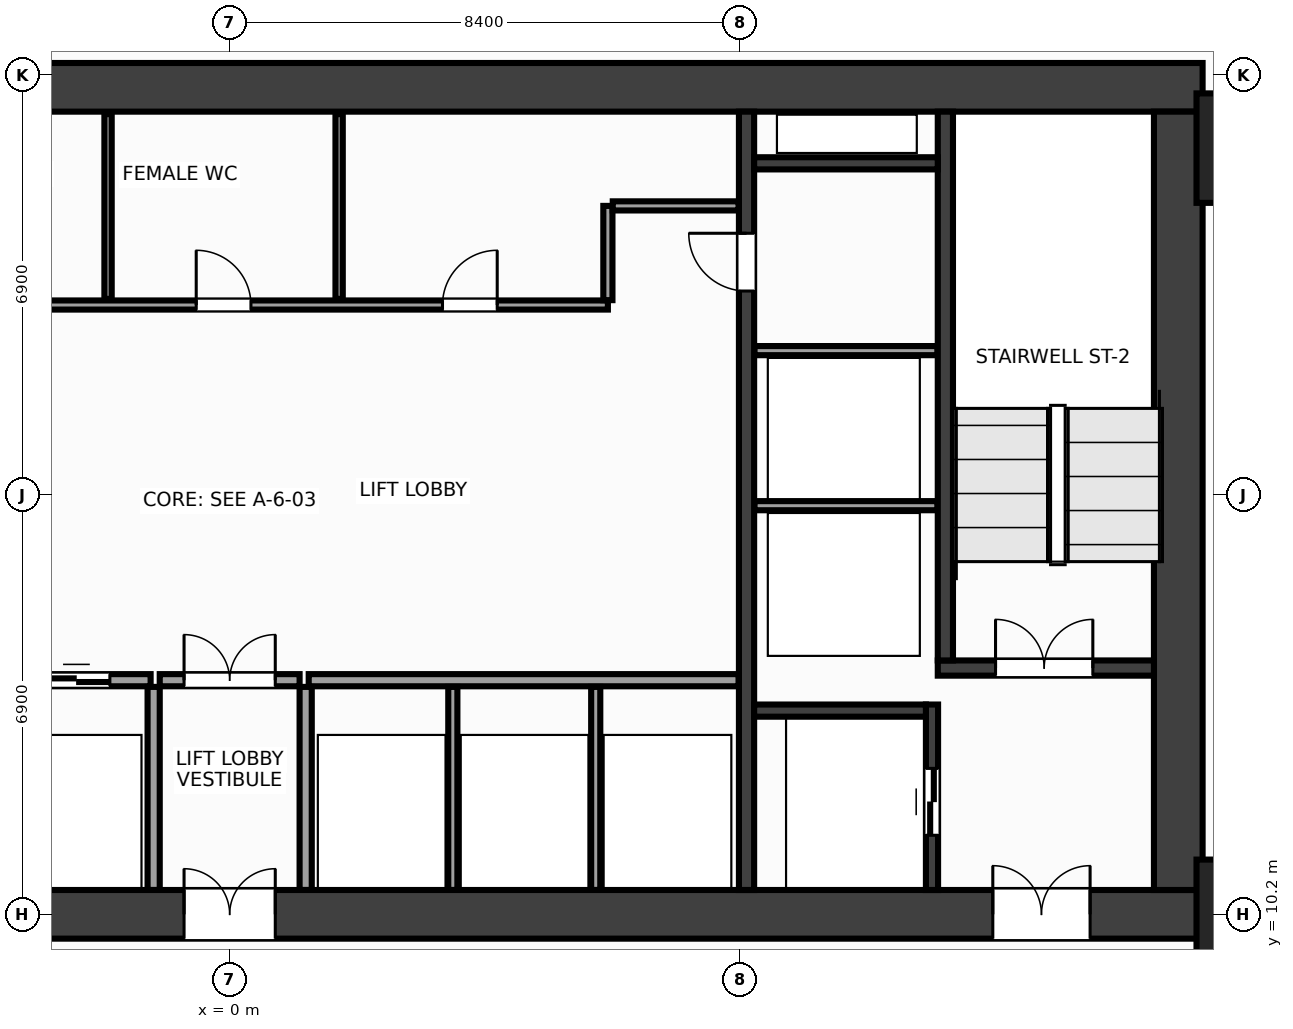
"""IFC4 building model, lengths in metres.
Left out: names, types, materials, properties, quantities, classifications, styles, units other than length and angle.
Written with IfcOpenShell. Run it as: python <this file> out.ifc"""

import sys

from ifc_helpers import new_model, si_unit, direction, frame, frame_2d, origin, origin_2d, place, context, subcontext, project, spatial, rectangle, extrude, source, transform, mapped, element, fill, save


model = new_model("IFC4")
c1 = context("Model", 3, precision=1e-05, world=origin(), true_north=direction((0.0, 1.0)))
c2 = subcontext(c1, "Body", "Model", "MODEL_VIEW")
j1 = project(units=[si_unit("LENGTHUNIT", "METRE"), si_unit("PLANEANGLEUNIT", "RADIAN")], contexts=[c1])
p1 = place(None, origin())
s1 = spatial("IfcSite", under=j1, at=p1, CompositionType="ELEMENT")
p2 = place(p1, origin())
s2 = spatial("IfcBuilding", under=s1, at=p2, CompositionType="ELEMENT")
p3 = place(p2, frame((0.0, 0.0, 34.4)))
s3 = spatial("IfcBuildingStorey", under=s2, at=p3, CompositionType="ELEMENT", Elevation=34.4)
m1 = source(origin(), c2, "Body", "SweptSolid", [
    extrude(rectangle(XDim=32.0, YDim=0.8, at=frame_2d((16.0, 0.0))), origin(), (0.0, 0.0, 1.0), 3.6),
])
p4 = place(p3, frame((-16.0, 23.8, 0.0), z_axis=(0.0, 0.0, 1.0), x_axis=(1.0, 0.0, 0.0)))
e1 = element("IfcWall", 1, at=p4, inside=s3, PredefinedType="SHEAR", context=c2, shape_type="MappedRepresentation", body=[
    mapped(m1, transform((0.0, 0.0, 0.0), x_axis=(1.0, 0.0, 0.0), y_axis=(0.0, 1.0, 0.0), z_axis=(0.0, 0.0, 1.0), scale=1.0)),
])
p5 = place(p3, frame((-16.0, 10.2, 0.0), z_axis=(0.0, 0.0, 1.0), x_axis=(1.0, 0.0, 0.0)))
e2 = element("IfcWall", 2, at=p5, inside=s3, PredefinedType="SHEAR", context=c2, shape_type="MappedRepresentation", body=[
    mapped(m1, transform((0.0, 0.0, 0.0), x_axis=(1.0, 0.0, 0.0), y_axis=(0.0, 1.0, 0.0), z_axis=(0.0, 0.0, 1.0), scale=1.0)),
])
p6 = place(p5, frame((1.85, 0.0, 0.0)))
e3 = element("IfcOpeningElement", 3, at=p6, cuts=e2, PredefinedType="OPENING", context=c2, shape_type="SweptSolid", body=[
    extrude(rectangle(XDim=1.6, YDim=2.15, at=frame_2d((0.8, 1.075))), frame((0.0, 0.412, 0.0), z_axis=(0.0, -1.0, 0.0), x_axis=(1.0, 0.0, 0.0)), (0.0, 0.0, 1.0), 0.824),
])
p7 = place(p5, frame((28.55, 0.0, 0.0)))
e4 = element("IfcOpeningElement", 4, at=p7, cuts=e2, PredefinedType="OPENING", context=c2, shape_type="SweptSolid", body=[
    extrude(rectangle(XDim=1.6, YDim=2.15, at=frame_2d((0.8, 1.075))), frame((0.0, 0.412, 0.0), z_axis=(0.0, -1.0, 0.0), x_axis=(1.0, 0.0, 0.0)), (0.0, 0.0, 1.0), 0.824),
])
p8 = place(p5, frame((15.25, 0.0, 0.0)))
e5 = element("IfcOpeningElement", 5, at=p8, cuts=e2, PredefinedType="OPENING", context=c2, shape_type="SweptSolid", body=[
    extrude(rectangle(XDim=1.5, YDim=2.2, at=frame_2d((0.75, 1.1))), frame((0.0, 0.412, 0.0), z_axis=(0.0, -1.0, 0.0), x_axis=(1.0, 0.0, 0.0)), (0.0, 0.0, 1.0), 0.824),
])
m2 = source(origin(), c2, "Body", "SweptSolid", [
    extrude(rectangle(XDim=12.8, YDim=0.8, at=frame_2d((6.4, 0.0))), origin(), (0.0, 0.0, 1.0), 3.6),
])
p9 = place(p3, frame((15.6, 10.6, 0.0), z_axis=(0.0, 0.0, 1.0), x_axis=(0.0, 1.0, 0.0)))
e6 = element("IfcWall", 6, at=p9, inside=s3, PredefinedType="SHEAR", context=c2, shape_type="MappedRepresentation", body=[
    mapped(m2, transform((0.0, 0.0, 0.0), x_axis=(1.0, 0.0, 0.0), y_axis=(0.0, 1.0, 0.0), z_axis=(0.0, 0.0, 1.0), scale=1.0)),
])
m3 = source(origin(), c2, "Body", "SweptSolid", [
    extrude(rectangle(XDim=12.8, YDim=0.25, at=frame_2d((6.4, 0.0))), origin(), (0.0, 0.0, 1.0), 3.6),
])
p10 = place(p3, frame((8.5, 10.6, 0.0), z_axis=(0.0, 0.0, 1.0), x_axis=(0.0, 1.0, 0.0)))
e7 = element("IfcWall", 7, at=p10, inside=s3, PredefinedType="SHEAR", context=c2, shape_type="MappedRepresentation", body=[
    mapped(m3, transform((0.0, 0.0, 0.0), x_axis=(1.0, 0.0, 0.0), y_axis=(0.0, 1.0, 0.0), z_axis=(0.0, 0.0, 1.0), scale=1.0)),
])
p11 = place(p10, frame((9.85, 0.0, 0.0)))
e8 = element("IfcOpeningElement", 8, at=p11, cuts=e7, PredefinedType="OPENING", context=c2, shape_type="SweptSolid", body=[
    extrude(rectangle(XDim=0.95, YDim=2.15, at=frame_2d((0.475, 1.075))), frame((0.0, 0.137, 0.0), z_axis=(0.0, -1.0, 0.0), x_axis=(1.0, 0.0, 0.0)), (0.0, 0.0, 1.0), 0.274),
])
m4 = source(origin(), c2, "Body", "SweptSolid", [
    extrude(rectangle(XDim=3.555, YDim=0.25, at=frame_2d((1.777, 0.0))), origin(), (0.0, 0.0, 1.0), 3.6),
])
p12 = place(p3, frame((11.645, 14.25, 0.0), z_axis=(0.0, 0.0, 1.0), x_axis=(1.0, 0.0, 0.0)))
e9 = element("IfcWall", 9, at=p12, inside=s3, PredefinedType="SHEAR", context=c2, shape_type="MappedRepresentation", body=[
    mapped(m4, transform((0.0, 0.0, 0.0), x_axis=(1.0, 0.0, 0.0), y_axis=(0.0, 1.0, 0.0), z_axis=(0.0, 0.0, 1.0), scale=1.0)),
])
p13 = place(p12, frame((0.95, 0.0, 0.0)))
e10 = element("IfcOpeningElement", 10, at=p13, cuts=e9, PredefinedType="OPENING", context=c2, shape_type="SweptSolid", body=[
    extrude(rectangle(XDim=1.6, YDim=2.15, at=frame_2d((0.8, 1.075))), frame((0.0, 0.137, 0.0), z_axis=(0.0, -1.0, 0.0), x_axis=(1.0, 0.0, 0.0)), (0.0, 0.0, 1.0), 0.274),
])
m5 = source(origin(), c2, "Body", "SweptSolid", [
    extrude(rectangle(XDim=9.025, YDim=0.25, at=frame_2d((4.512, 0.0))), origin(), (0.0, 0.0, 1.0), 3.6),
])
p14 = place(p3, frame((11.77, 14.375, 0.0), z_axis=(0.0, 0.0, 1.0), x_axis=(0.0, 1.0, 0.0)))
e11 = element("IfcWall", 11, at=p14, inside=s3, PredefinedType="SHEAR", context=c2, shape_type="MappedRepresentation", body=[
    mapped(m5, transform((0.0, 0.0, 0.0), x_axis=(1.0, 0.0, 0.0), y_axis=(0.0, 1.0, 0.0), z_axis=(0.0, 0.0, 1.0), scale=1.0)),
])
m6 = source(origin(), c2, "Body", "SweptSolid", [
    extrude(rectangle(XDim=3.05, YDim=0.2, at=frame_2d((1.525, 0.0))), origin(), (0.0, 0.0, 1.0), 3.6),
])
p15 = place(p3, frame((11.55, 10.6, 0.0), z_axis=(0.0, 0.0, 1.0), x_axis=(0.0, 1.0, 0.0)))
e12 = element("IfcWall", 12, at=p15, inside=s3, PredefinedType="SHEAR", context=c2, shape_type="MappedRepresentation", body=[
    mapped(m6, transform((0.0, 0.0, 0.0), x_axis=(1.0, 0.0, 0.0), y_axis=(0.0, 1.0, 0.0), z_axis=(0.0, 0.0, 1.0), scale=1.0)),
])
p16 = place(p15, frame((0.9, 0.0, 0.0)))
e13 = element("IfcOpeningElement", 13, at=p16, cuts=e12, PredefinedType="OPENING", context=c2, shape_type="SweptSolid", body=[
    extrude(rectangle(XDim=1.1, YDim=2.15, at=frame_2d((0.55, 1.075))), frame((0.0, 0.112, 0.0), z_axis=(0.0, -1.0, 0.0), x_axis=(1.0, 0.0, 0.0)), (0.0, 0.0, 1.0), 0.224),
])
m7 = source(origin(), c2, "Body", "SweptSolid", [
    extrude(rectangle(XDim=2.825, YDim=0.2, at=frame_2d((1.413, 0.0))), origin(), (0.0, 0.0, 1.0), 3.6),
])
p17 = place(p3, frame((8.625, 13.55, 0.0), z_axis=(0.0, 0.0, 1.0), x_axis=(1.0, 0.0, 0.0)))
e14 = element("IfcWall", 14, at=p17, inside=s3, PredefinedType="SHEAR", context=c2, shape_type="MappedRepresentation", body=[
    mapped(m7, transform((0.0, 0.0, 0.0), x_axis=(1.0, 0.0, 0.0), y_axis=(0.0, 1.0, 0.0), z_axis=(0.0, 0.0, 1.0), scale=1.0)),
])
m8 = source(origin(), c2, "Body", "SweptSolid", [
    extrude(rectangle(XDim=3.02, YDim=0.2, at=frame_2d((1.51, 0.0))), origin(), (0.0, 0.0, 1.0), 3.6),
])
p18 = place(p3, frame((8.625, 22.55, 0.0), z_axis=(0.0, 0.0, 1.0), x_axis=(1.0, 0.0, 0.0)))
e15 = element("IfcWall", 15, at=p18, inside=s3, PredefinedType="SHEAR", context=c2, shape_type="MappedRepresentation", body=[
    mapped(m8, transform((0.0, 0.0, 0.0), x_axis=(1.0, 0.0, 0.0), y_axis=(0.0, 1.0, 0.0), z_axis=(0.0, 0.0, 1.0), scale=1.0)),
])
m9 = source(origin(), c2, "Body", "SweptSolid", [
    extrude(rectangle(XDim=1.8, YDim=1.8, at=origin_2d()), origin(), (0.0, 0.0, 1.0), 3.6),
])
for number, where, z_axis, x_axis in (
    (16, (16.8, 10.2, 0.0), (0.0, 0.0, 1.0), (1.0, 0.0, 0.0)),
    (17, (16.8, 22.8, 0.0), (0.0, 0.0, 1.0), (1.0, 0.0, 0.0)),
):
    element("IfcColumn", number, at=place(p3, frame(where, z_axis=z_axis, x_axis=x_axis)), inside=s3, PredefinedType="COLUMN", context=c2, shape_type="MappedRepresentation", body=[
        mapped(m9, transform((0.0, 0.0, 0.0), x_axis=(1.0, 0.0, 0.0), y_axis=(0.0, 1.0, 0.0), z_axis=(0.0, 0.0, 1.0), scale=1.0)),
    ])
m10 = source(origin(), c2, "Body", "SweptSolid", [
    extrude(rectangle(XDim=3.01, YDim=0.15, at=frame_2d((1.505, 0.0))), origin(), (0.0, 0.0, 1.0), 3.36),
])
for number, where, z_axis, x_axis in (
    (18, (8.63, 16.92, 0.0), (0.0, 0.0, 1.0), (1.0, 0.0, 0.0)),
    (19, (8.63, 19.47, 0.0), (0.0, 0.0, 1.0), (1.0, 0.0, 0.0)),
):
    element("IfcWall", number, at=place(p3, frame(where, z_axis=z_axis, x_axis=x_axis)), inside=s3, PredefinedType="PARTITIONING", context=c2, shape_type="MappedRepresentation", body=[
        mapped(m10, transform((0.0, 0.0, 0.0), x_axis=(1.0, 0.0, 0.0), y_axis=(0.0, 1.0, 0.0), z_axis=(0.0, 0.0, 1.0), scale=1.0)),
    ])
m11 = source(origin(), c2, "Body", "SweptSolid", [
    extrude(rectangle(XDim=7.07, YDim=0.2, at=frame_2d((3.535, 0.0))), origin(), (0.0, 0.0, 1.0), 3.36),
])
p19 = place(p3, frame((-8.37, 14.05, 0.0), z_axis=(0.0, 0.0, 1.0), x_axis=(1.0, 0.0, 0.0)))
e20 = element("IfcWall", 20, at=p19, inside=s3, PredefinedType="PARTITIONING", context=c2, shape_type="MappedRepresentation", body=[
    mapped(m11, transform((0.0, 0.0, 0.0), x_axis=(1.0, 0.0, 0.0), y_axis=(0.0, 1.0, 0.0), z_axis=(0.0, 0.0, 1.0), scale=1.0)),
])
p20 = place(p19, frame((0.6, 0.0, 0.0)))
e21 = element("IfcOpeningElement", 21, at=p20, cuts=e20, PredefinedType="OPENING", context=c2, shape_type="SweptSolid", body=[
    extrude(rectangle(XDim=1.1, YDim=2.15, at=frame_2d((0.55, 1.075))), frame((0.0, 0.112, 0.0), z_axis=(0.0, -1.0, 0.0), x_axis=(1.0, 0.0, 0.0)), (0.0, 0.0, 1.0), 0.224),
])
p21 = place(p19, frame((2.95, 0.0, 0.0)))
e22 = element("IfcOpeningElement", 22, at=p21, cuts=e20, PredefinedType="OPENING", context=c2, shape_type="SweptSolid", body=[
    extrude(rectangle(XDim=1.1, YDim=2.15, at=frame_2d((0.55, 1.075))), frame((0.0, 0.112, 0.0), z_axis=(0.0, -1.0, 0.0), x_axis=(1.0, 0.0, 0.0)), (0.0, 0.0, 1.0), 0.224),
])
p22 = place(p19, frame((5.3, 0.0, 0.0)))
e23 = element("IfcOpeningElement", 23, at=p22, cuts=e20, PredefinedType="OPENING", context=c2, shape_type="SweptSolid", body=[
    extrude(rectangle(XDim=1.1, YDim=2.15, at=frame_2d((0.55, 1.075))), frame((0.0, 0.112, 0.0), z_axis=(0.0, -1.0, 0.0), x_axis=(1.0, 0.0, 0.0)), (0.0, 0.0, 1.0), 0.224),
])
p23 = place(p3, frame((1.3, 14.05, 0.0), z_axis=(0.0, 0.0, 1.0), x_axis=(1.0, 0.0, 0.0)))
e24 = element("IfcWall", 24, at=p23, inside=s3, PredefinedType="PARTITIONING", context=c2, shape_type="MappedRepresentation", body=[
    mapped(m11, transform((0.0, 0.0, 0.0), x_axis=(1.0, 0.0, 0.0), y_axis=(0.0, 1.0, 0.0), z_axis=(0.0, 0.0, 1.0), scale=1.0)),
])
m12 = source(origin(), c2, "Body", "SweptSolid", [
    extrude(rectangle(XDim=3.34, YDim=0.2, at=frame_2d((1.67, 0.0))), origin(), (0.0, 0.0, 1.0), 3.36),
])
for number, where, z_axis, x_axis in (
    (25, (-1.25, 10.6, 0.0), (0.0, 0.0, 1.0), (0.0, 1.0, 0.0)),
    (26, (1.25, 10.6, 0.0), (0.0, 0.0, 1.0), (0.0, 1.0, 0.0)),
):
    element("IfcWall", number, at=place(p3, frame(where, z_axis=z_axis, x_axis=x_axis)), inside=s3, PredefinedType="PARTITIONING", context=c2, shape_type="MappedRepresentation", body=[
        mapped(m12, transform((0.0, 0.0, 0.0), x_axis=(1.0, 0.0, 0.0), y_axis=(0.0, 1.0, 0.0), z_axis=(0.0, 0.0, 1.0), scale=1.0)),
    ])
m13 = source(origin(), c2, "Body", "SweptSolid", [
    extrude(rectangle(XDim=2.3, YDim=0.2, at=frame_2d((1.15, 0.0))), origin(), (0.0, 0.0, 1.0), 3.36),
])
p24 = place(p3, frame((-1.15, 14.05, 0.0), z_axis=(0.0, 0.0, 1.0), x_axis=(1.0, 0.0, 0.0)))
e27 = element("IfcWall", 27, at=p24, inside=s3, PredefinedType="PARTITIONING", context=c2, shape_type="MappedRepresentation", body=[
    mapped(m13, transform((0.0, 0.0, 0.0), x_axis=(1.0, 0.0, 0.0), y_axis=(0.0, 1.0, 0.0), z_axis=(0.0, 0.0, 1.0), scale=1.0)),
])
p25 = place(p24, frame((0.4, 0.0, 0.0)))
e28 = element("IfcOpeningElement", 28, at=p25, cuts=e27, PredefinedType="OPENING", context=c2, shape_type="SweptSolid", body=[
    extrude(rectangle(XDim=1.5, YDim=2.2, at=frame_2d((0.75, 1.1))), frame((0.0, 0.112, 0.0), z_axis=(0.0, -1.0, 0.0), x_axis=(1.0, 0.0, 0.0)), (0.0, 0.0, 1.0), 0.224),
])
m14 = source(origin(), c2, "Body", "SweptSolid", [
    extrude(rectangle(XDim=14.59, YDim=0.15, at=frame_2d((7.295, 0.0))), origin(), (0.0, 0.0, 1.0), 3.36),
])
p26 = place(p3, frame((-8.37, 20.22, 0.0), z_axis=(0.0, 0.0, 1.0), x_axis=(1.0, 0.0, 0.0)))
e29 = element("IfcWall", 29, at=p26, inside=s3, PredefinedType="PARTITIONING", context=c2, shape_type="MappedRepresentation", body=[
    mapped(m14, transform((0.0, 0.0, 0.0), x_axis=(1.0, 0.0, 0.0), y_axis=(0.0, 1.0, 0.0), z_axis=(0.0, 0.0, 1.0), scale=1.0)),
])
p27 = place(p26, frame((1.06, 0.0, 0.0)))
e30 = element("IfcOpeningElement", 30, at=p27, cuts=e29, PredefinedType="OPENING", context=c2, shape_type="SweptSolid", body=[
    extrude(rectangle(XDim=0.9, YDim=2.15, at=frame_2d((0.45, 1.075))), frame((0.0, 0.087, 0.0), z_axis=(0.0, -1.0, 0.0), x_axis=(1.0, 0.0, 0.0)), (0.0, 0.0, 1.0), 0.174),
])
p28 = place(p26, frame((4.22, 0.0, 0.0)))
e31 = element("IfcOpeningElement", 31, at=p28, cuts=e29, PredefinedType="OPENING", context=c2, shape_type="SweptSolid", body=[
    extrude(rectangle(XDim=0.9, YDim=2.15, at=frame_2d((0.45, 1.075))), frame((0.0, 0.087, 0.0), z_axis=(0.0, -1.0, 0.0), x_axis=(1.0, 0.0, 0.0)), (0.0, 0.0, 1.0), 0.174),
])
p29 = place(p26, frame((7.82, 0.0, 0.0)))
e32 = element("IfcOpeningElement", 32, at=p29, cuts=e29, PredefinedType="OPENING", context=c2, shape_type="SweptSolid", body=[
    extrude(rectangle(XDim=0.9, YDim=2.15, at=frame_2d((0.45, 1.075))), frame((0.0, 0.087, 0.0), z_axis=(0.0, -1.0, 0.0), x_axis=(1.0, 0.0, 0.0)), (0.0, 0.0, 1.0), 0.174),
])
p30 = place(p26, frame((11.87, 0.0, 0.0)))
e33 = element("IfcOpeningElement", 33, at=p30, cuts=e29, PredefinedType="OPENING", context=c2, shape_type="SweptSolid", body=[
    extrude(rectangle(XDim=0.9, YDim=2.15, at=frame_2d((0.45, 1.075))), frame((0.0, 0.087, 0.0), z_axis=(0.0, -1.0, 0.0), x_axis=(1.0, 0.0, 0.0)), (0.0, 0.0, 1.0), 0.174),
])
m15 = source(origin(), c2, "Body", "SweptSolid", [
    extrude(rectangle(XDim=1.55, YDim=0.15, at=frame_2d((0.775, 0.0))), origin(), (0.0, 0.0, 1.0), 3.36),
])
p31 = place(p3, frame((6.22, 20.3, 0.0), z_axis=(0.0, 0.0, 1.0), x_axis=(0.0, 1.0, 0.0)))
e34 = element("IfcWall", 34, at=p31, inside=s3, PredefinedType="PARTITIONING", context=c2, shape_type="MappedRepresentation", body=[
    mapped(m15, transform((0.0, 0.0, 0.0), x_axis=(1.0, 0.0, 0.0), y_axis=(0.0, 1.0, 0.0), z_axis=(0.0, 0.0, 1.0), scale=1.0)),
])
m16 = source(origin(), c2, "Body", "SweptSolid", [
    extrude(rectangle(XDim=2.07, YDim=0.15, at=frame_2d((1.035, 0.0))), origin(), (0.0, 0.0, 1.0), 3.36),
])
p32 = place(p3, frame((6.3, 21.85, 0.0), z_axis=(0.0, 0.0, 1.0), x_axis=(1.0, 0.0, 0.0)))
e35 = element("IfcWall", 35, at=p32, inside=s3, PredefinedType="PARTITIONING", context=c2, shape_type="MappedRepresentation", body=[
    mapped(m16, transform((0.0, 0.0, 0.0), x_axis=(1.0, 0.0, 0.0), y_axis=(0.0, 1.0, 0.0), z_axis=(0.0, 0.0, 1.0), scale=1.0)),
])
m17 = source(origin(), c2, "Body", "SweptSolid", [
    extrude(rectangle(XDim=3.34, YDim=0.15, at=frame_2d((1.67, 0.0))), origin(), (0.0, 0.0, 1.0), 3.36),
])
for number, where, z_axis, x_axis in (
    (36, (3.67, 10.6, 0.0), (0.0, 0.0, 1.0), (0.0, 1.0, 0.0)),
    (37, (6.02, 10.6, 0.0), (0.0, 0.0, 1.0), (0.0, 1.0, 0.0)),
):
    element("IfcWall", number, at=place(p3, frame(where, z_axis=z_axis, x_axis=x_axis)), inside=s3, PredefinedType="PARTITIONING", context=c2, shape_type="MappedRepresentation", body=[
        mapped(m17, transform((0.0, 0.0, 0.0), x_axis=(1.0, 0.0, 0.0), y_axis=(0.0, 1.0, 0.0), z_axis=(0.0, 0.0, 1.0), scale=1.0)),
    ])
m18 = source(origin(), c2, "Body", "SweptSolid", [
    extrude(rectangle(XDim=3.04, YDim=0.12, at=frame_2d((1.52, 0.0))), origin(), (0.0, 0.0, 1.0), 3.36),
])
for number, where, z_axis, x_axis in (
    (38, (-2.0, 20.32, 0.0), (0.0, 0.0, 1.0), (0.0, 1.0, 0.0)),
    (39, (1.8, 20.32, 0.0), (0.0, 0.0, 1.0), (0.0, 1.0, 0.0)),
):
    element("IfcWall", number, at=place(p3, frame(where, z_axis=z_axis, x_axis=x_axis)), inside=s3, PredefinedType="PARTITIONING", context=c2, shape_type="MappedRepresentation", body=[
        mapped(m18, transform((0.0, 0.0, 0.0), x_axis=(1.0, 0.0, 0.0), y_axis=(0.0, 1.0, 0.0), z_axis=(0.0, 0.0, 1.0), scale=1.0)),
    ])
m19 = source(origin(), c2, "Body", "SweptSolid", [
    extrude(rectangle(XDim=1.6, YDim=2.15, at=frame_2d((0.8, 1.075))), frame((0.0, 0.025, 0.0), z_axis=(0.0, -1.0, 0.0), x_axis=(1.0, 0.0, 0.0)), (0.0, 0.0, 1.0), 0.05),
])
p33 = place(p13, origin())
e40 = element("IfcDoor", 40, at=p33, inside=s3, OperationType="DOUBLE_DOOR_SINGLE_SWING", PredefinedType="DOOR", context=c2, shape_type="MappedRepresentation", body=[
    mapped(m19, transform((0.0, 0.0, 0.0), x_axis=(1.0, 0.0, 0.0), y_axis=(0.0, 1.0, 0.0), z_axis=(0.0, 0.0, 1.0), scale=1.0)),
])
fill(e10, e40)
p34 = place(p7, origin())
e41 = element("IfcDoor", 41, at=p34, inside=s3, OperationType="DOUBLE_DOOR_SINGLE_SWING", PredefinedType="DOOR", context=c2, shape_type="MappedRepresentation", body=[
    mapped(m19, transform((0.0, 0.0, 0.0), x_axis=(1.0, 0.0, 0.0), y_axis=(0.0, 1.0, 0.0), z_axis=(0.0, 0.0, 1.0), scale=1.0)),
])
fill(e4, e41)
m20 = source(origin(), c2, "Body", "SweptSolid", [
    extrude(rectangle(XDim=1.1, YDim=2.15, at=frame_2d((0.55, 1.075))), frame((0.0, 0.025, 0.0), z_axis=(0.0, -1.0, 0.0), x_axis=(1.0, 0.0, 0.0)), (0.0, 0.0, 1.0), 0.05),
])
p35 = place(p16, origin())
e42 = element("IfcDoor", 42, at=p35, inside=s3, OperationType="DOUBLE_DOOR_SLIDING", PredefinedType="DOOR", context=c2, shape_type="MappedRepresentation", body=[
    mapped(m20, transform((0.0, 0.0, 0.0), x_axis=(1.0, 0.0, 0.0), y_axis=(0.0, 1.0, 0.0), z_axis=(0.0, 0.0, 1.0), scale=1.0)),
])
fill(e13, e42)
m21 = source(origin(), c2, "Body", "SweptSolid", [
    extrude(rectangle(XDim=0.95, YDim=2.15, at=frame_2d((0.475, 1.075))), frame((0.0, 0.025, 0.0), z_axis=(0.0, -1.0, 0.0), x_axis=(1.0, 0.0, 0.0)), (0.0, 0.0, 1.0), 0.05),
])
p36 = place(p11, origin())
e43 = element("IfcDoor", 43, at=p36, inside=s3, OperationType="SINGLE_SWING_RIGHT", PredefinedType="DOOR", context=c2, shape_type="MappedRepresentation", body=[
    mapped(m21, transform((0.0, 0.0, 0.0), x_axis=(1.0, 0.0, 0.0), y_axis=(0.0, 1.0, 0.0), z_axis=(0.0, 0.0, 1.0), scale=1.0)),
])
fill(e8, e43)
p37 = place(p22, origin())
e44 = element("IfcDoor", 44, at=p37, inside=s3, OperationType="DOUBLE_DOOR_SLIDING", PredefinedType="DOOR", context=c2, shape_type="MappedRepresentation", body=[
    mapped(m20, transform((0.0, 0.0, 0.0), x_axis=(1.0, 0.0, 0.0), y_axis=(0.0, 1.0, 0.0), z_axis=(0.0, 0.0, 1.0), scale=1.0)),
])
fill(e23, e44)
m22 = source(origin(), c2, "Body", "SweptSolid", [
    extrude(rectangle(XDim=1.5, YDim=2.2, at=frame_2d((0.75, 1.1))), frame((0.0, 0.025, 0.0), z_axis=(0.0, -1.0, 0.0), x_axis=(1.0, 0.0, 0.0)), (0.0, 0.0, 1.0), 0.05),
])
p38 = place(p25, origin())
e45 = element("IfcDoor", 45, at=p38, inside=s3, OperationType="DOUBLE_DOOR_SINGLE_SWING", PredefinedType="DOOR", context=c2, shape_type="MappedRepresentation", body=[
    mapped(m22, transform((0.0, 0.0, 0.0), x_axis=(1.0, 0.0, 0.0), y_axis=(0.0, 1.0, 0.0), z_axis=(0.0, 0.0, 1.0), scale=1.0)),
])
fill(e28, e45)
p39 = place(p8, origin())
e46 = element("IfcDoor", 46, at=p39, inside=s3, OperationType="DOUBLE_DOOR_SINGLE_SWING", PredefinedType="DOOR", context=c2, shape_type="MappedRepresentation", body=[
    mapped(m22, transform((0.0, 0.0, 0.0), x_axis=(1.0, 0.0, 0.0), y_axis=(0.0, 1.0, 0.0), z_axis=(0.0, 0.0, 1.0), scale=1.0)),
])
fill(e5, e46)
m23 = source(origin(), c2, "Body", "SweptSolid", [
    extrude(rectangle(XDim=0.9, YDim=2.15, at=frame_2d((0.45, 1.075))), frame((0.0, 0.025, 0.0), z_axis=(0.0, -1.0, 0.0), x_axis=(1.0, 0.0, 0.0)), (0.0, 0.0, 1.0), 0.05),
])
p40 = place(p29, origin())
e47 = element("IfcDoor", 47, at=p40, inside=s3, OperationType="SINGLE_SWING_LEFT", PredefinedType="DOOR", context=c2, shape_type="MappedRepresentation", body=[
    mapped(m23, transform((0.0, 0.0, 0.0), x_axis=(1.0, 0.0, 0.0), y_axis=(0.0, 1.0, 0.0), z_axis=(0.0, 0.0, 1.0), scale=1.0)),
])
fill(e32, e47)
p41 = place(p30, origin())
e48 = element("IfcDoor", 48, at=p41, inside=s3, OperationType="SINGLE_SWING_RIGHT", PredefinedType="DOOR", context=c2, shape_type="MappedRepresentation", body=[
    mapped(m23, transform((0.0, 0.0, 0.0), x_axis=(1.0, 0.0, 0.0), y_axis=(0.0, 1.0, 0.0), z_axis=(0.0, 0.0, 1.0), scale=1.0)),
])
fill(e33, e48)
save(model, sys.argv[1])
